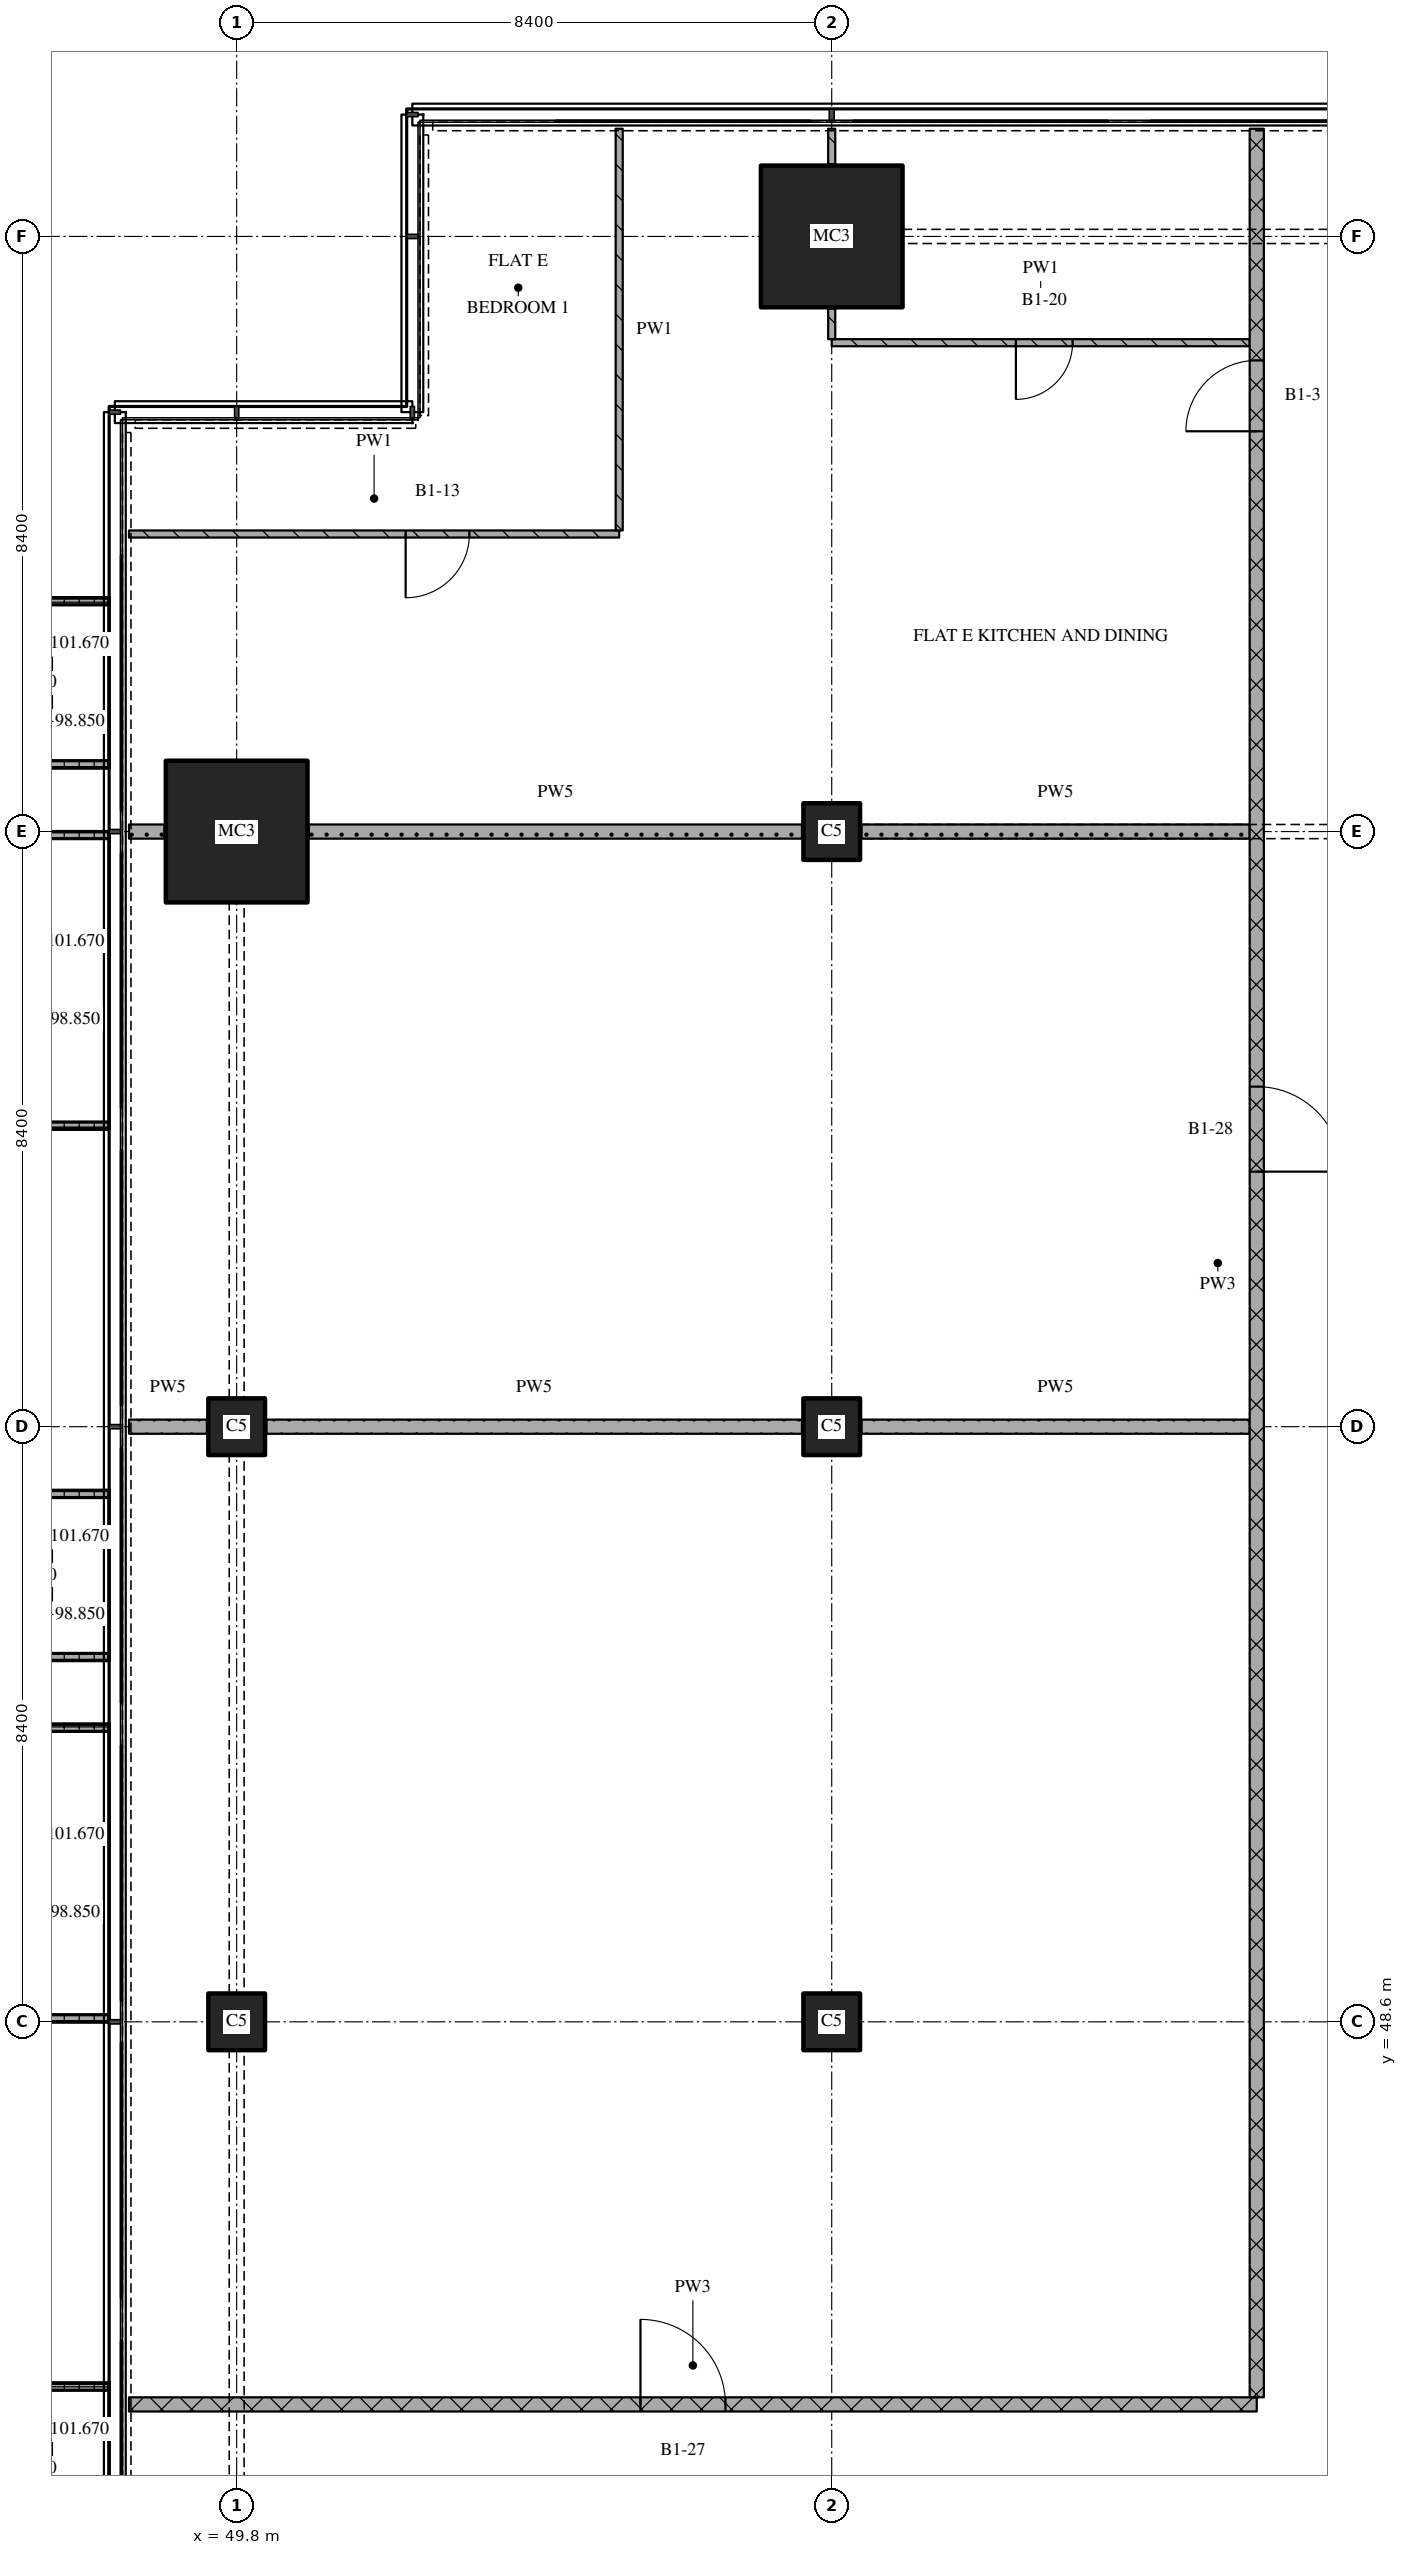
"""IFC4 building model, lengths in metres.
Left out: names, types, materials, properties, quantities, classifications, styles, units other than length and angle.
Written with IfcOpenShell. Run it as: python <this file> out.ifc"""

import sys

from ifc_helpers import new_model, si_unit, direction, frame, frame_2d, origin, origin_2d, place, context, subcontext, project, spatial, polyline, rectangle, outline, extrude, element, fill, save


model = new_model("IFC4")
c1 = context("Model", 3, precision=1e-05, world=origin(), true_north=direction((0.0, 1.0)))
c2 = subcontext(c1, "Body", "Model", "MODEL_VIEW")
j1 = project(units=[si_unit("LENGTHUNIT", "METRE"), si_unit("PLANEANGLEUNIT", "RADIAN")], contexts=[c1])
p1 = place(None, origin())
s1 = spatial("IfcSite", under=j1, at=p1, CompositionType="ELEMENT")
p2 = place(p1, origin())
s2 = spatial("IfcBuilding", under=s1, at=p2, CompositionType="ELEMENT")
p3 = place(p2, frame((0.0, 0.0, 98.85)))
s3 = spatial("IfcBuildingStorey", under=s2, at=p3, CompositionType="ELEMENT", Elevation=98.85)
for number, where, z_axis, x_axis in (
    (1, (49.8, 48.6, 0.0), (0.0, 0.0, 1.0), (1.0, 0.0, 0.0)),
    (2, (49.8, 57.0, 0.0), (0.0, 0.0, 1.0), (1.0, 0.0, 0.0)),
):
    element("IfcColumn", number, at=place(p3, frame(where, z_axis=z_axis, x_axis=x_axis)), inside=s3, PredefinedType="COLUMN", context=c2, shape_type="SweptSolid", body=[
        extrude(rectangle(XDim=0.8, YDim=0.8, at=origin_2d()), origin(), (0.0, 0.0, 1.0), 3.6),
    ])
p4 = place(p3, frame((49.8, 65.4, 0.0), z_axis=(0.0, 0.0, 1.0), x_axis=(1.0, 0.0, 0.0)))
e3 = element("IfcColumn", 3, at=p4, inside=s3, PredefinedType="COLUMN", context=c2, shape_type="SweptSolid", body=[
    extrude(rectangle(XDim=2.0, YDim=2.0, at=origin_2d()), origin(), (0.0, 0.0, 1.0), 3.6),
])
for number, where, z_axis, x_axis in (
    (4, (58.2, 48.6, 0.0), (0.0, 0.0, 1.0), (1.0, 0.0, 0.0)),
    (5, (58.2, 57.0, 0.0), (0.0, 0.0, 1.0), (1.0, 0.0, 0.0)),
    (6, (58.2, 65.4, 0.0), (0.0, 0.0, 1.0), (1.0, 0.0, 0.0)),
):
    element("IfcColumn", number, at=place(p3, frame(where, z_axis=z_axis, x_axis=x_axis)), inside=s3, PredefinedType="COLUMN", context=c2, shape_type="SweptSolid", body=[
        extrude(rectangle(XDim=0.8, YDim=0.8, at=origin_2d()), origin(), (0.0, 0.0, 1.0), 3.6),
    ])
p5 = place(p3, frame((58.2, 73.8, 0.0), z_axis=(0.0, 0.0, 1.0), x_axis=(1.0, 0.0, 0.0)))
e7 = element("IfcColumn", 7, at=p5, inside=s3, PredefinedType="COLUMN", context=c2, shape_type="SweptSolid", body=[
    extrude(rectangle(XDim=2.0, YDim=2.0, at=origin_2d()), origin(), (0.0, 0.0, 1.0), 3.6),
])
p6 = place(p3, origin())
e8 = element("IfcWall", 8, at=p6, inside=s3, PredefinedType="SOLIDWALL", context=c2, shape_type="SweptSolid", body=[
    extrude(outline(polyline([(48.0, 68.7), (48.0, 68.6), (46.5, 68.6), (46.5, 66.4), (48.0, 66.4), (48.0, 66.3), (46.4, 66.3), (46.4, 68.7), (48.0, 68.7)])), origin(), (0.0, 0.0, 1.0), 1.0),
])
p7 = place(p3, origin())
e9 = element("IfcWall", 9, at=p7, inside=s3, PredefinedType="SOLIDWALL", context=c2, shape_type="SweptSolid", body=[
    extrude(outline(polyline([(48.0, 65.4), (48.0, 65.3), (46.367, 65.3), (46.367, 61.3), (48.0, 61.3), (48.0, 61.2), (46.267, 61.2), (46.267, 65.4), (48.0, 65.4)])), origin(), (0.0, 0.0, 1.0), 1.0),
])
p8 = place(p3, origin())
e10 = element("IfcWall", 10, at=p8, inside=s3, PredefinedType="SOLIDWALL", context=c2, shape_type="SweptSolid", body=[
    extrude(outline(polyline([(48.0, 56.1), (48.0, 56.0), (46.5, 56.0), (46.5, 53.8), (48.0, 53.8), (48.0, 53.7), (46.4, 53.7), (46.4, 56.1), (48.0, 56.1)])), origin(), (0.0, 0.0, 1.0), 1.0),
])
p9 = place(p3, origin())
e11 = element("IfcWall", 11, at=p9, inside=s3, PredefinedType="SOLIDWALL", context=c2, shape_type="SweptSolid", body=[
    extrude(outline(polyline([(48.0, 52.8), (48.0, 52.7), (46.367, 52.7), (46.367, 48.7), (48.0, 48.7), (48.0, 48.6), (46.267, 48.6), (46.267, 52.8), (48.0, 52.8)])), origin(), (0.0, 0.0, 1.0), 1.0),
])
p10 = place(p3, origin())
e12 = element("IfcWall", 12, at=p10, inside=s3, PredefinedType="SOLIDWALL", context=c2, shape_type="SweptSolid", body=[
    extrude(outline(polyline([(48.0, 43.5), (48.0, 43.4), (46.5, 43.4), (46.5, 41.2), (48.0, 41.2), (48.0, 41.1), (46.4, 41.1), (46.4, 43.5), (48.0, 43.5)])), origin(), (0.0, 0.0, 1.0), 1.0),
])
p11 = place(p3, frame((48.28, 43.2, 0.0), z_axis=(0.0, 0.0, 1.0), x_axis=(1.0, 0.0, 0.0)))
e13 = element("IfcWall", 13, at=p11, inside=s3, PredefinedType="PARTITIONING", context=c2, shape_type="SweptSolid", body=[
    extrude(rectangle(XDim=15.92, YDim=0.2, at=frame_2d((7.96, 0.0))), origin(), (0.0, 0.0, 1.0), 3.32),
])
p12 = place(p11, frame((7.22, 0.0, 0.0)))
e14 = element("IfcOpeningElement", 14, at=p12, cuts=e13, PredefinedType="OPENING", context=c2, shape_type="SweptSolid", body=[
    extrude(rectangle(XDim=1.2, YDim=2.1, at=frame_2d((0.6, 1.05))), frame((0.0, 0.11, 0.0), z_axis=(0.0, -1.0, 0.0), x_axis=(1.0, 0.0, 0.0)), (0.0, 0.0, 1.0), 0.22),
])
p13 = place(p3, frame((48.28, 57.0, 0.0), z_axis=(0.0, 0.0, 1.0), x_axis=(1.0, 0.0, 0.0)))
e15 = element("IfcWall", 15, at=p13, inside=s3, PredefinedType="PARTITIONING", context=c2, shape_type="SweptSolid", body=[
    extrude(rectangle(XDim=1.1, YDim=0.2, at=frame_2d((0.55, 0.0))), origin(), (0.0, 0.0, 1.0), 3.32),
])
p14 = place(p3, frame((50.22, 57.0, 0.0), z_axis=(0.0, 0.0, 1.0), x_axis=(1.0, 0.0, 0.0)))
e16 = element("IfcWall", 16, at=p14, inside=s3, PredefinedType="PARTITIONING", context=c2, shape_type="SweptSolid", body=[
    extrude(rectangle(XDim=7.56, YDim=0.2, at=frame_2d((3.78, 0.0))), origin(), (0.0, 0.0, 1.0), 3.32),
])
p15 = place(p3, frame((58.62, 57.0, 0.0), z_axis=(0.0, 0.0, 1.0), x_axis=(1.0, 0.0, 0.0)))
e17 = element("IfcWall", 17, at=p15, inside=s3, PredefinedType="PARTITIONING", context=c2, shape_type="SweptSolid", body=[
    extrude(rectangle(XDim=5.48, YDim=0.2, at=frame_2d((2.74, 0.0))), origin(), (0.0, 0.0, 1.0), 3.32),
])
p16 = place(p3, frame((48.28, 65.4, 0.0), z_axis=(0.0, 0.0, 1.0), x_axis=(1.0, 0.0, 0.0)))
e18 = element("IfcWall", 18, at=p16, inside=s3, PredefinedType="PARTITIONING", context=c2, shape_type="SweptSolid", body=[
    extrude(rectangle(XDim=0.5, YDim=0.2, at=frame_2d((0.25, 0.0))), origin(), (0.0, 0.0, 1.0), 3.32),
])
p17 = place(p3, frame((50.82, 65.4, 0.0), z_axis=(0.0, 0.0, 1.0), x_axis=(1.0, 0.0, 0.0)))
e19 = element("IfcWall", 19, at=p17, inside=s3, PredefinedType="PARTITIONING", context=c2, shape_type="SweptSolid", body=[
    extrude(rectangle(XDim=6.96, YDim=0.2, at=frame_2d((3.48, 0.0))), origin(), (0.0, 0.0, 1.0), 3.32),
])
p18 = place(p3, frame((58.62, 65.4, 0.0), z_axis=(0.0, 0.0, 1.0), x_axis=(1.0, 0.0, 0.0)))
e20 = element("IfcWall", 20, at=p18, inside=s3, PredefinedType="PARTITIONING", context=c2, shape_type="SweptSolid", body=[
    extrude(rectangle(XDim=5.48, YDim=0.2, at=frame_2d((2.74, 0.0))), origin(), (0.0, 0.0, 1.0), 2.82),
])
p19 = place(p3, frame((48.28, 69.6, 0.0), z_axis=(0.0, 0.0, 1.0), x_axis=(1.0, 0.0, 0.0)))
e21 = element("IfcWall", 21, at=p19, inside=s3, PredefinedType="PARTITIONING", context=c2, shape_type="SweptSolid", body=[
    extrude(rectangle(XDim=6.92, YDim=0.1, at=frame_2d((3.46, 0.0))), origin(), (0.0, 0.0, 1.0), 3.32),
])
p20 = place(p19, frame((3.905, 0.0, 0.0)))
e22 = element("IfcOpeningElement", 22, at=p20, cuts=e21, PredefinedType="OPENING", context=c2, shape_type="SweptSolid", body=[
    extrude(rectangle(XDim=0.9, YDim=2.1, at=frame_2d((0.45, 1.05))), frame((0.0, 0.06, 0.0), z_axis=(0.0, -1.0, 0.0), x_axis=(1.0, 0.0, 0.0)), (0.0, 0.0, 1.0), 0.12),
])
p21 = place(p3, frame((58.2, 72.3, 0.0), z_axis=(0.0, 0.0, 1.0), x_axis=(1.0, 0.0, 0.0)))
e23 = element("IfcWall", 23, at=p21, inside=s3, PredefinedType="PARTITIONING", context=c2, shape_type="SweptSolid", body=[
    extrude(rectangle(XDim=5.9, YDim=0.1, at=frame_2d((2.95, 0.0))), origin(), (0.0, 0.0, 1.0), 3.32),
])
p22 = place(p21, frame((2.6, 0.0, 0.0)))
e24 = element("IfcOpeningElement", 24, at=p22, cuts=e23, PredefinedType="OPENING", context=c2, shape_type="SweptSolid", body=[
    extrude(rectangle(XDim=0.8, YDim=2.1, at=frame_2d((0.4, 1.05))), frame((0.0, 0.06, 0.0), z_axis=(0.0, -1.0, 0.0), x_axis=(1.0, 0.0, 0.0)), (0.0, 0.0, 1.0), 0.12),
])
p23 = place(p3, frame((55.2, 75.32, 0.0), z_axis=(0.0, 0.0, 1.0), x_axis=(0.0, -1.0, 0.0)))
e25 = element("IfcWall", 25, at=p23, inside=s3, PredefinedType="PARTITIONING", context=c2, shape_type="SweptSolid", body=[
    extrude(rectangle(XDim=5.67, YDim=0.1, at=frame_2d((2.835, 0.0))), origin(), (0.0, 0.0, 1.0), 3.32),
])
p24 = place(p3, frame((58.2, 72.78, 0.0), z_axis=(0.0, 0.0, 1.0), x_axis=(0.0, -1.0, 0.0)))
e26 = element("IfcWall", 26, at=p24, inside=s3, PredefinedType="PARTITIONING", context=c2, shape_type="SweptSolid", body=[
    extrude(rectangle(XDim=0.43, YDim=0.1, at=frame_2d((0.215, 0.0))), origin(), (0.0, 0.0, 1.0), 3.32),
])
p25 = place(p3, frame((58.2, 75.32, 0.0), z_axis=(0.0, 0.0, 1.0), x_axis=(0.0, -1.0, 0.0)))
e27 = element("IfcWall", 27, at=p25, inside=s3, PredefinedType="PARTITIONING", context=c2, shape_type="SweptSolid", body=[
    extrude(rectangle(XDim=0.5, YDim=0.1, at=frame_2d((0.25, 0.0))), origin(), (0.0, 0.0, 1.0), 3.32),
])
p26 = place(p3, frame((64.2, 43.3, 0.0), z_axis=(0.0, 0.0, 1.0), x_axis=(0.0, 1.0, 0.0)))
e28 = element("IfcWall", 28, at=p26, inside=s3, PredefinedType="PARTITIONING", context=c2, shape_type="SweptSolid", body=[
    extrude(rectangle(XDim=32.02, YDim=0.2, at=frame_2d((16.01, 0.0))), origin(), (0.0, 0.0, 1.0), 3.32),
])
p27 = place(p26, frame((17.3, 0.0, 0.0)))
e29 = element("IfcOpeningElement", 29, at=p27, cuts=e28, PredefinedType="OPENING", context=c2, shape_type="SweptSolid", body=[
    extrude(rectangle(XDim=1.2, YDim=2.1, at=frame_2d((0.6, 1.05))), frame((0.0, 0.11, 0.0), z_axis=(0.0, -1.0, 0.0), x_axis=(1.0, 0.0, 0.0)), (0.0, 0.0, 1.0), 0.22),
])
p28 = place(p26, frame((27.75, 0.0, 0.0)))
e30 = element("IfcOpeningElement", 30, at=p28, cuts=e28, PredefinedType="OPENING", context=c2, shape_type="SweptSolid", body=[
    extrude(rectangle(XDim=1.0, YDim=2.1, at=frame_2d((0.5, 1.05))), frame((0.0, 0.11, 0.0), z_axis=(0.0, -1.0, 0.0), x_axis=(1.0, 0.0, 0.0)), (0.0, 0.0, 1.0), 0.22),
])
p29 = place(p12, origin())
e31 = element("IfcDoor", 31, at=p29, inside=s3, OperationType="SINGLE_SWING_LEFT", PredefinedType="DOOR", context=c2, shape_type="SweptSolid", body=[
    extrude(rectangle(XDim=1.2, YDim=2.1, at=frame_2d((0.6, 1.05))), frame((0.0, 0.025, 0.0), z_axis=(0.0, -1.0, 0.0), x_axis=(1.0, 0.0, 0.0)), (0.0, 0.0, 1.0), 0.05),
])
fill(e14, e31)
p30 = place(p20, origin())
e32 = element("IfcDoor", 32, at=p30, inside=s3, OperationType="SINGLE_SWING_RIGHT", PredefinedType="DOOR", context=c2, shape_type="SweptSolid", body=[
    extrude(rectangle(XDim=0.9, YDim=2.1, at=frame_2d((0.45, 1.05))), frame((0.0, 0.025, 0.0), z_axis=(0.0, -1.0, 0.0), x_axis=(1.0, 0.0, 0.0)), (0.0, 0.0, 1.0), 0.05),
])
fill(e22, e32)
p31 = place(p22, origin())
e33 = element("IfcDoor", 33, at=p31, inside=s3, OperationType="SINGLE_SWING_RIGHT", PredefinedType="DOOR", context=c2, shape_type="SweptSolid", body=[
    extrude(rectangle(XDim=0.8, YDim=2.1, at=frame_2d((0.4, 1.05))), frame((0.0, 0.025, 0.0), z_axis=(0.0, -1.0, 0.0), x_axis=(1.0, 0.0, 0.0)), (0.0, 0.0, 1.0), 0.05),
])
fill(e24, e33)
p32 = place(p27, origin())
e34 = element("IfcDoor", 34, at=p32, inside=s3, OperationType="SINGLE_SWING_RIGHT", PredefinedType="DOOR", context=c2, shape_type="SweptSolid", body=[
    extrude(rectangle(XDim=1.2, YDim=2.1, at=frame_2d((0.6, 1.05))), frame((0.0, 0.025, 0.0), z_axis=(0.0, -1.0, 0.0), x_axis=(1.0, 0.0, 0.0)), (0.0, 0.0, 1.0), 0.05),
])
fill(e29, e34)
p33 = place(p28, origin())
e35 = element("IfcDoor", 35, at=p33, inside=s3, OperationType="SINGLE_SWING_LEFT", PredefinedType="DOOR", context=c2, shape_type="SweptSolid", body=[
    extrude(rectangle(XDim=1.0, YDim=2.1, at=frame_2d((0.5, 1.05))), frame((0.0, 0.025, 0.0), z_axis=(0.0, -1.0, 0.0), x_axis=(1.0, 0.0, 0.0)), (0.0, 0.0, 1.0), 0.05),
])
fill(e30, e35)
save(model, sys.argv[1])
